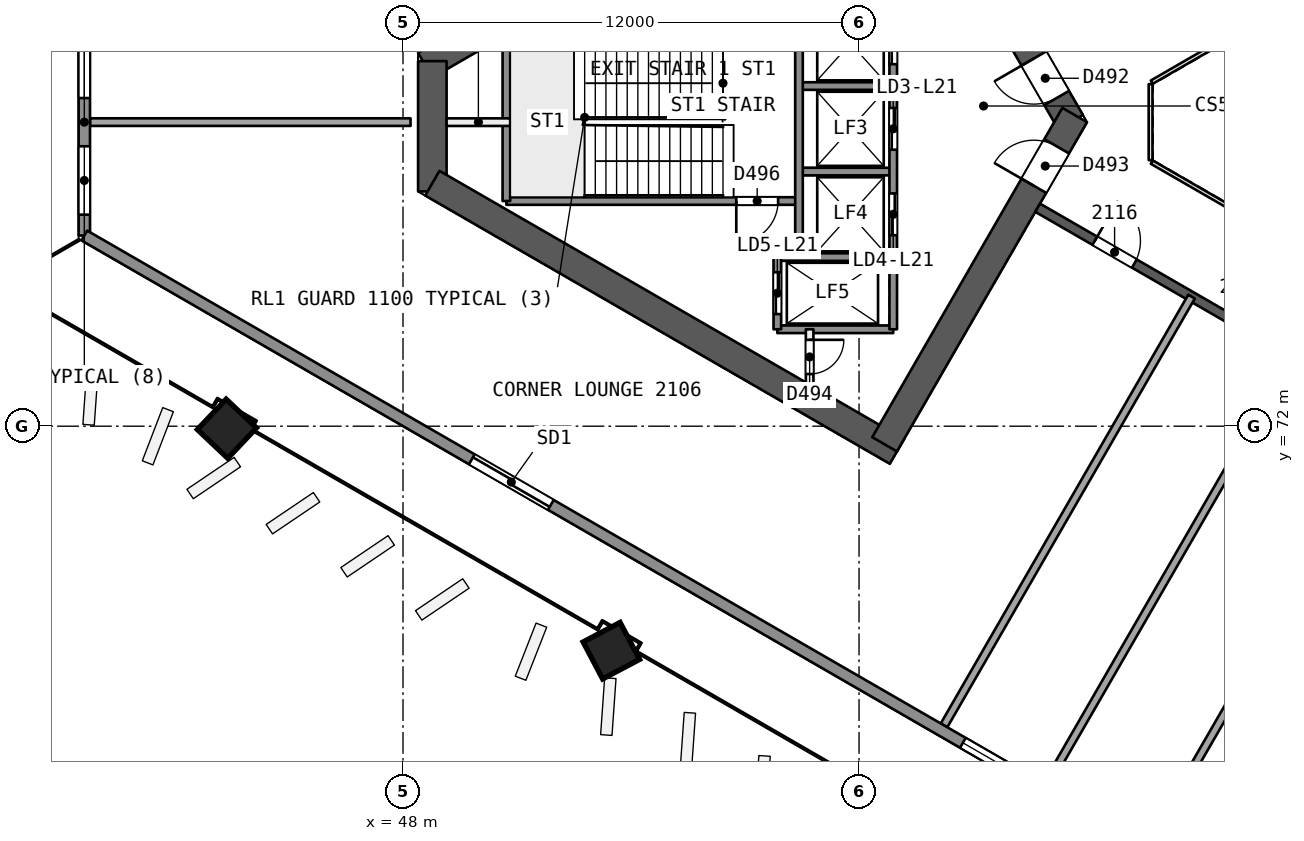
"""IFC4 building model, lengths in metres.
Left out: names, types, materials, properties, quantities, classifications, styles, units other than length and angle.
Written with IfcOpenShell. Run it as: python <this file> out.ifc"""

import sys

from ifc_helpers import new_model, si_unit, direction, frame, frame_2d, origin, origin_2d, place, context, subcontext, project, spatial, rectangle, extrude, element, fill, save


model = new_model("IFC4")
c1 = context("Model", 3, precision=1e-05, world=origin(), true_north=direction((0.0, 1.0)))
c2 = subcontext(c1, "Body", "Model", "MODEL_VIEW")
j1 = project(units=[si_unit("LENGTHUNIT", "METRE"), si_unit("PLANEANGLEUNIT", "RADIAN")], contexts=[c1])
p1 = place(None, origin())
s1 = spatial("IfcSite", under=j1, at=p1, CompositionType="ELEMENT")
p2 = place(p1, origin())
s2 = spatial("IfcBuilding", under=s1, at=p2, CompositionType="ELEMENT")
p3 = place(p2, frame((0.0, 0.0, 90.6)))
s3 = spatial("IfcBuildingStorey", under=s2, at=p3, CompositionType="ELEMENT", Elevation=90.6)
p4 = place(p3, frame((65.567, 80.0, 0.0), z_axis=(0.0, 0.0, 1.0), x_axis=(-0.499988615364, 0.866031976607, 0.0)))
e1 = element("IfcWall", 1, at=p4, inside=s3, PredefinedType="SHEAR", context=c2, shape_type="SweptSolid", body=[
    extrude(rectangle(XDim=10.163, YDim=0.75, at=frame_2d((5.082, 0.0))), origin(), (0.0, 0.0, 1.0), 3.7),
])
p5 = place(p4, frame((0.733, 0.0, 0.0)))
e2 = element("IfcOpeningElement", 2, at=p5, cuts=e1, PredefinedType="OPENING", context=c2, shape_type="SweptSolid", body=[
    extrude(rectangle(XDim=1.2, YDim=2.1, at=frame_2d((0.6, 1.05))), frame((0.0, 0.385, 0.0), z_axis=(0.0, -1.0, 0.0), x_axis=(1.0, 0.0, 0.0)), (0.0, 0.0, 1.0), 0.771),
])
p6 = place(p3, frame((60.673, 88.477, 0.0), z_axis=(0.0, 0.0, 1.0), x_axis=(-0.8660248072, -0.500001033313, 0.0)))
e3 = element("IfcWall", 3, at=p6, inside=s3, PredefinedType="SHEAR", context=c2, shape_type="SweptSolid", body=[
    extrude(rectangle(XDim=13.958, YDim=0.75, at=frame_2d((6.979, 0.0))), origin(), (0.0, 0.0, 1.0), 3.7),
])
p7 = place(p3, frame((48.772, 81.606, 0.0), z_axis=(0.0, 0.0, 1.0), x_axis=(0.0, -1.0, 0.0)))
e4 = element("IfcWall", 4, at=p7, inside=s3, PredefinedType="SHEAR", context=c2, shape_type="SweptSolid", body=[
    extrude(rectangle(XDim=3.429, YDim=0.75, at=frame_2d((1.714, 0.0))), origin(), (0.0, 0.0, 1.0), 3.7),
])
p8 = place(p3, frame((48.772, 78.394, 0.0), z_axis=(0.0, 0.0, 1.0), x_axis=(0.866028339916, -0.499994914436, 0.0)))
e5 = element("IfcWall", 5, at=p8, inside=s3, PredefinedType="SHEAR", context=c2, shape_type="SweptSolid", body=[
    extrude(rectangle(XDim=14.117, YDim=0.75, at=frame_2d((7.059, 0.0))), origin(), (0.0, 0.0, 1.0), 3.7),
])
p9 = place(p3, frame((60.673, 71.523, 0.0), z_axis=(0.0, 0.0, 1.0), x_axis=(0.499997052475, 0.866027105532, 0.0)))
e6 = element("IfcWall", 6, at=p9, inside=s3, PredefinedType="SHEAR", context=c2, shape_type="SweptSolid", body=[
    extrude(rectangle(XDim=10.005, YDim=0.75, at=frame_2d((5.002, 0.0))), origin(), (0.0, 0.0, 1.0), 3.7),
])
p10 = place(p9, frame((7.855, 0.0, 0.0)))
e7 = element("IfcOpeningElement", 7, at=p10, cuts=e6, PredefinedType="OPENING", context=c2, shape_type="SweptSolid", body=[
    extrude(rectangle(XDim=1.2, YDim=2.1, at=frame_2d((0.6, 1.05))), frame((0.0, 0.385, 0.0), z_axis=(0.0, -1.0, 0.0), x_axis=(1.0, 0.0, 0.0)), (0.0, 0.0, 1.0), 0.771),
])
p11 = place(p3, frame((64.7, 77.748, 0.0), z_axis=(0.0, 0.0, 1.0), x_axis=(0.866026492143, -0.499998114903, 0.0)))
e8 = element("IfcWall", 8, at=p11, inside=s3, PredefinedType="SHEAR", context=c2, shape_type="SweptSolid", body=[
    extrude(rectangle(XDim=15.588, YDim=0.25, at=frame_2d((7.794, 0.0))), origin(), (0.0, 0.0, 1.0), 3.2),
])
p12 = place(p11, frame((1.738, 0.0, 0.0)))
e9 = element("IfcOpeningElement", 9, at=p12, cuts=e8, PredefinedType="OPENING", context=c2, shape_type="SweptSolid", body=[
    extrude(rectangle(XDim=1.2, YDim=2.4, at=frame_2d((0.6, 1.2))), frame((0.0, 0.135, 0.0), z_axis=(0.0, -1.0, 0.0), x_axis=(1.0, 0.0, 0.0)), (0.0, 0.0, 1.0), 0.271),
])
p13 = place(p11, frame((5.785, 0.0, 0.0)))
e10 = element("IfcOpeningElement", 10, at=p13, cuts=e8, PredefinedType="OPENING", context=c2, shape_type="SweptSolid", body=[
    extrude(rectangle(XDim=0.9, YDim=2.1, at=frame_2d((0.45, 1.05))), frame((0.0, 0.135, 0.0), z_axis=(0.0, -1.0, 0.0), x_axis=(1.0, 0.0, 0.0)), (0.0, 0.0, 1.0), 0.271),
])
p14 = place(p11, frame((8.903, 0.0, 0.0)))
e11 = element("IfcOpeningElement", 11, at=p14, cuts=e8, PredefinedType="OPENING", context=c2, shape_type="SweptSolid", body=[
    extrude(rectangle(XDim=0.9, YDim=2.1, at=frame_2d((0.45, 1.05))), frame((0.0, 0.135, 0.0), z_axis=(0.0, -1.0, 0.0), x_axis=(1.0, 0.0, 0.0)), (0.0, 0.0, 1.0), 0.271),
])
p15 = place(p11, frame((12.75, 0.0, 0.0)))
e12 = element("IfcOpeningElement", 12, at=p15, cuts=e8, PredefinedType="OPENING", context=c2, shape_type="SweptSolid", body=[
    extrude(rectangle(XDim=1.0, YDim=2.1, at=frame_2d((0.5, 1.05))), frame((0.0, 0.135, 0.0), z_axis=(0.0, -1.0, 0.0), x_axis=(1.0, 0.0, 0.0)), (0.0, 0.0, 1.0), 0.271),
])
p16 = place(p3, frame((43.333, 71.925, 0.0), z_axis=(0.028559101991, 0.006859460986, 0.999568569678), x_axis=(-0.866410384874, 0.498876768373, 0.021331079692)))
e13 = element("IfcColumn", 13, at=p16, inside=s3, PredefinedType="COLUMN", context=c2, shape_type="SweptSolid", body=[
    extrude(rectangle(XDim=1.1, YDim=1.1, at=origin_2d()), origin(), (0.0, 0.0, 1.0), 3.702),
])
p17 = place(p3, frame((53.46, 66.079, 0.0), z_axis=(0.019328516974, 0.012138044789, 0.999739504221), x_axis=(-0.865690909737, 0.500465383244, 0.010660627254)))
e14 = element("IfcColumn", 14, at=p17, inside=s3, PredefinedType="COLUMN", context=c2, shape_type="SweptSolid", body=[
    extrude(rectangle(XDim=1.1, YDim=1.1, at=origin_2d()), origin(), (0.0, 0.0, 1.0), 3.701),
])
p18 = place(p3, frame((39.763, 80.001, 0.0), z_axis=(0.0, 0.0, 1.0), x_axis=(1.0, 0.0, 0.0)))
e15 = element("IfcWall", 15, at=p18, inside=s3, PredefinedType="PARTITIONING", context=c2, shape_type="SweptSolid", body=[
    extrude(rectangle(XDim=8.435, YDim=0.2, at=frame_2d((4.218, 0.0))), origin(), (0.0, 0.0, 1.0), 3.2),
])
for number, where, z_axis, x_axis in (
    (16, (62.236, 64.128, 0.0), (0.0, 0.0, 1.0), (0.5, 0.866, 0.0)),
    (17, (64.936, 62.569, 0.0), (0.0, 0.0, 1.0), (0.5, 0.866, 0.0)),
    (18, (67.636, 61.01, 0.0), (0.0, 0.0, 1.0), (0.5, 0.866, 0.0)),
):
    element("IfcWall", number, at=place(p3, frame(where, z_axis=z_axis, x_axis=x_axis)), inside=s3, PredefinedType="PARTITIONING", context=c2, shape_type="SweptSolid", body=[
        extrude(rectangle(XDim=13.028, YDim=0.2, at=frame_2d((6.514, 0.0))), origin(), (0.0, 0.0, 1.0), 3.2),
    ])
p19 = place(p3, frame((39.614, 77.017, 0.0), z_axis=(0.0, 0.0, 1.0), x_axis=(0.0, 1.0, 0.0)))
e19 = element("IfcWall", 19, at=p19, inside=s3, PredefinedType="SOLIDWALL", context=c2, shape_type="SweptSolid", body=[
    extrude(rectangle(XDim=5.966, YDim=0.3, at=frame_2d((2.983, 0.0))), origin(), (0.0, 0.0, 1.0), 3.2),
])
p20 = place(p19, frame((0.549, 0.0, 0.9)))
e20 = element("IfcOpeningElement", 20, at=p20, cuts=e19, PredefinedType="OPENING", context=c2, shape_type="SweptSolid", body=[
    extrude(rectangle(XDim=1.8, YDim=1.5, at=frame_2d((0.9, 0.75))), frame((0.0, 0.161, 0.0), z_axis=(0.0, -1.0, 0.0), x_axis=(1.0, 0.0, 0.0)), (0.0, 0.0, 1.0), 0.321),
])
p21 = place(p19, frame((3.617, 0.0, 0.9)))
e21 = element("IfcOpeningElement", 21, at=p21, cuts=e19, PredefinedType="OPENING", context=c2, shape_type="SweptSolid", body=[
    extrude(rectangle(XDim=1.8, YDim=1.5, at=frame_2d((0.9, 0.75))), frame((0.0, 0.161, 0.0), z_axis=(0.0, -1.0, 0.0), x_axis=(1.0, 0.0, 0.0)), (0.0, 0.0, 1.0), 0.321),
])
p22 = place(p3, frame((90.11, 47.863, 0.0), z_axis=(0.0, 0.0, 1.0), x_axis=(-0.866024236478, 0.500002021829, 0.0)))
e22 = element("IfcWall", 22, at=p22, inside=s3, PredefinedType="SOLIDWALL", context=c2, shape_type="SweptSolid", body=[
    extrude(rectangle(XDim=58.307, YDim=0.3, at=frame_2d((29.154, 0.0))), origin(), (0.0, 0.0, 1.0), 3.2),
])
p23 = place(p22, frame((44.133, 0.0, 0.0)))
e23 = element("IfcOpeningElement", 23, at=p23, cuts=e22, PredefinedType="OPENING", context=c2, shape_type="SweptSolid", body=[
    extrude(rectangle(XDim=2.4, YDim=2.4, at=frame_2d((1.2, 1.2))), frame((0.0, 0.161, 0.0), z_axis=(0.0, -1.0, 0.0), x_axis=(1.0, 0.0, 0.0)), (0.0, 0.0, 1.0), 0.321),
])
p24 = place(p22, frame((22.498, 0.0, 0.0)))
e24 = element("IfcOpeningElement", 24, at=p24, cuts=e22, PredefinedType="OPENING", context=c2, shape_type="SweptSolid", body=[
    extrude(rectangle(XDim=2.4, YDim=2.4, at=frame_2d((1.2, 1.2))), frame((0.0, 0.161, 0.0), z_axis=(0.0, -1.0, 0.0), x_axis=(1.0, 0.0, 0.0)), (0.0, 0.0, 1.0), 0.321),
])
p25 = place(p22, frame((10.65, 0.0, 0.0)))
e25 = element("IfcOpeningElement", 25, at=p25, cuts=e22, PredefinedType="OPENING", context=c2, shape_type="SweptSolid", body=[
    extrude(rectangle(XDim=2.4, YDim=2.4, at=frame_2d((1.2, 1.2))), frame((0.0, 0.161, 0.0), z_axis=(0.0, -1.0, 0.0), x_axis=(1.0, 0.0, 0.0)), (0.0, 0.0, 1.0), 0.321),
])
p26 = place(p22, frame((29.812, 0.0, 0.9)))
e26 = element("IfcOpeningElement", 26, at=p26, cuts=e22, PredefinedType="OPENING", context=c2, shape_type="SweptSolid", body=[
    extrude(rectangle(XDim=1.8, YDim=1.5, at=frame_2d((0.9, 0.75))), frame((0.0, 0.161, 0.0), z_axis=(0.0, -1.0, 0.0), x_axis=(1.0, 0.0, 0.0)), (0.0, 0.0, 1.0), 0.321),
])
p27 = place(p22, frame((26.695, 0.0, 0.9)))
e27 = element("IfcOpeningElement", 27, at=p27, cuts=e22, PredefinedType="OPENING", context=c2, shape_type="SweptSolid", body=[
    extrude(rectangle(XDim=1.8, YDim=1.5, at=frame_2d((0.9, 0.75))), frame((0.0, 0.161, 0.0), z_axis=(0.0, -1.0, 0.0), x_axis=(1.0, 0.0, 0.0)), (0.0, 0.0, 1.0), 0.321),
])
p28 = place(p3, frame((60.9, 80.95, 0.0), z_axis=(0.0, 0.0, 1.0), x_axis=(-1.0, 0.0, 0.0)))
e28 = element("IfcWall", 28, at=p28, inside=s3, PredefinedType="SOLIDWALL", context=c2, shape_type="SweptSolid", body=[
    extrude(rectangle(XDim=2.48, YDim=0.2, at=frame_2d((1.24, 0.0))), origin(), (0.0, 0.0, 1.0), 3.2),
])
p29 = place(p3, frame((50.82, 80.0, 0.0), z_axis=(0.0, 0.0, 1.0), x_axis=(-1.0, 0.0, 0.0)))
e29 = element("IfcWall", 29, at=p29, inside=s3, PredefinedType="PARTITIONING", context=c2, shape_type="SweptSolid", body=[
    extrude(rectangle(XDim=1.673, YDim=0.2, at=frame_2d((0.836, 0.0))), origin(), (0.0, 0.0, 1.0), 3.2),
])
p30 = place(p3, frame((60.9, 78.7, 0.0), z_axis=(0.0, 0.0, 1.0), x_axis=(-1.0, 0.0, 0.0)))
e30 = element("IfcWall", 30, at=p30, inside=s3, PredefinedType="SOLIDWALL", context=c2, shape_type="SweptSolid", body=[
    extrude(rectangle(XDim=2.48, YDim=0.2, at=frame_2d((1.24, 0.0))), origin(), (0.0, 0.0, 1.0), 3.2),
])
p31 = place(p3, frame((58.42, 77.925, 0.0), z_axis=(0.0, 0.0, 1.0), x_axis=(-1.0, 0.0, 0.0)))
e31 = element("IfcWall", 31, at=p31, inside=s3, PredefinedType="SOLIDWALL", context=c2, shape_type="SweptSolid", body=[
    extrude(rectangle(XDim=7.7, YDim=0.2, at=frame_2d((3.85, 0.0))), origin(), (0.0, 0.0, 1.0), 3.2),
])
p32 = place(p31, frame((0.55, 0.0, 0.0)))
e32 = element("IfcOpeningElement", 32, at=p32, cuts=e31, PredefinedType="OPENING", context=c2, shape_type="SweptSolid", body=[
    extrude(rectangle(XDim=1.1, YDim=2.1, at=frame_2d((0.55, 1.05))), frame((0.0, 0.11, 0.0), z_axis=(0.0, -1.0, 0.0), x_axis=(1.0, 0.0, 0.0)), (0.0, 0.0, 1.0), 0.221),
])
for number, where, z_axis, x_axis in (
    (33, (60.9, 76.45, 0.0), (0.0, 0.0, 1.0), (-1.0, 0.0, 0.0)),
    (34, (60.9, 74.55, 0.0), (0.0, 0.0, 1.0), (-1.0, 0.0, 0.0)),
):
    element("IfcWall", number, at=place(p3, frame(where, z_axis=z_axis, x_axis=x_axis)), inside=s3, PredefinedType="SOLIDWALL", context=c2, shape_type="SweptSolid", body=[
        extrude(rectangle(XDim=3.05, YDim=0.2, at=frame_2d((1.525, 0.0))), origin(), (0.0, 0.0, 1.0), 3.2),
    ])
p33 = place(p3, frame((60.9, 85.45, 0.0), z_axis=(0.0, 0.0, 1.0), x_axis=(0.0, -1.0, 0.0)))
e35 = element("IfcWall", 35, at=p33, inside=s3, PredefinedType="SOLIDWALL", context=c2, shape_type="SweptSolid", body=[
    extrude(rectangle(XDim=10.9, YDim=0.2, at=frame_2d((5.45, 0.0))), origin(), (0.0, 0.0, 1.0), 3.2),
])
p34 = place(p33, frame((0.575, 0.0, 0.0)))
e36 = element("IfcOpeningElement", 36, at=p34, cuts=e35, PredefinedType="OPENING", context=c2, shape_type="SweptSolid", body=[
    extrude(rectangle(XDim=1.1, YDim=2.1, at=frame_2d((0.55, 1.05))), frame((0.0, 0.11, 0.0), z_axis=(0.0, -1.0, 0.0), x_axis=(1.0, 0.0, 0.0)), (0.0, 0.0, 1.0), 0.221),
])
p35 = place(p33, frame((2.825, 0.0, 0.0)))
e37 = element("IfcOpeningElement", 37, at=p35, cuts=e35, PredefinedType="OPENING", context=c2, shape_type="SweptSolid", body=[
    extrude(rectangle(XDim=1.1, YDim=2.1, at=frame_2d((0.55, 1.05))), frame((0.0, 0.11, 0.0), z_axis=(0.0, -1.0, 0.0), x_axis=(1.0, 0.0, 0.0)), (0.0, 0.0, 1.0), 0.221),
])
p36 = place(p33, frame((5.075, 0.0, 0.0)))
e38 = element("IfcOpeningElement", 38, at=p36, cuts=e35, PredefinedType="OPENING", context=c2, shape_type="SweptSolid", body=[
    extrude(rectangle(XDim=1.1, YDim=2.1, at=frame_2d((0.55, 1.05))), frame((0.0, 0.11, 0.0), z_axis=(0.0, -1.0, 0.0), x_axis=(1.0, 0.0, 0.0)), (0.0, 0.0, 1.0), 0.221),
])
p37 = place(p33, frame((7.325, 0.0, 0.0)))
e39 = element("IfcOpeningElement", 39, at=p37, cuts=e35, PredefinedType="OPENING", context=c2, shape_type="SweptSolid", body=[
    extrude(rectangle(XDim=1.1, YDim=2.1, at=frame_2d((0.55, 1.05))), frame((0.0, 0.11, 0.0), z_axis=(0.0, -1.0, 0.0), x_axis=(1.0, 0.0, 0.0)), (0.0, 0.0, 1.0), 0.221),
])
p38 = place(p3, frame((58.7, 74.55, 0.0), z_axis=(0.0, 0.0, 1.0), x_axis=(0.0, -1.0, 0.0)))
e40 = element("IfcWall", 40, at=p38, inside=s3, PredefinedType="PARTITIONING", context=c2, shape_type="SweptSolid", body=[
    extrude(rectangle(XDim=1.455, YDim=0.2, at=frame_2d((0.728, 0.0))), origin(), (0.0, 0.0, 1.0), 3.2),
])
p39 = place(p38, frame((0.278, 0.0, 0.0)))
e41 = element("IfcOpeningElement", 41, at=p39, cuts=e40, PredefinedType="OPENING", context=c2, shape_type="SweptSolid", body=[
    extrude(rectangle(XDim=0.9, YDim=2.1, at=frame_2d((0.45, 1.05))), frame((0.0, 0.11, 0.0), z_axis=(0.0, -1.0, 0.0), x_axis=(1.0, 0.0, 0.0)), (0.0, 0.0, 1.0), 0.221),
])
p40 = place(p3, frame((58.42, 85.45, 0.0), z_axis=(0.0, 0.0, 1.0), x_axis=(0.0, -1.0, 0.0)))
e42 = element("IfcWall", 42, at=p40, inside=s3, PredefinedType="SOLIDWALL", context=c2, shape_type="SweptSolid", body=[
    extrude(rectangle(XDim=9.0, YDim=0.2, at=frame_2d((4.5, 0.0))), origin(), (0.0, 0.0, 1.0), 3.2),
])
p41 = place(p3, frame((57.85, 76.45, 0.0), z_axis=(0.0, 0.0, 1.0), x_axis=(0.0, -1.0, 0.0)))
e43 = element("IfcWall", 43, at=p41, inside=s3, PredefinedType="SOLIDWALL", context=c2, shape_type="SweptSolid", body=[
    extrude(rectangle(XDim=1.9, YDim=0.2, at=frame_2d((0.95, 0.0))), origin(), (0.0, 0.0, 1.0), 3.2),
])
p42 = place(p41, frame((0.4, 0.0, 0.0)))
e44 = element("IfcOpeningElement", 44, at=p42, cuts=e43, PredefinedType="OPENING", context=c2, shape_type="SweptSolid", body=[
    extrude(rectangle(XDim=1.1, YDim=2.1, at=frame_2d((0.55, 1.05))), frame((0.0, 0.11, 0.0), z_axis=(0.0, -1.0, 0.0), x_axis=(1.0, 0.0, 0.0)), (0.0, 0.0, 1.0), 0.221),
])
p43 = place(p3, frame((50.72, 82.075, 0.0), z_axis=(0.0, 0.0, 1.0), x_axis=(0.0, -1.0, 0.0)))
e45 = element("IfcWall", 45, at=p43, inside=s3, PredefinedType="SOLIDWALL", context=c2, shape_type="SweptSolid", body=[
    extrude(rectangle(XDim=4.15, YDim=0.2, at=frame_2d((2.075, 0.0))), origin(), (0.0, 0.0, 1.0), 3.2),
])
p44 = place(p3, frame((77.738, 86.846, 0.0), z_axis=(0.0, 0.0, 1.0), x_axis=(-0.866026658274, -0.499997827154, 0.0)))
e46 = element("IfcWall", 46, at=p44, inside=s3, PredefinedType="PARTITIONING", context=c2, shape_type="SweptSolid", body=[
    extrude(rectangle(XDim=11.588, YDim=0.1, at=frame_2d((5.794, 0.0))), origin(), (0.0, 0.0, 1.0), 3.2),
])
p45 = place(p3, frame((67.672, 81.0, 0.0), z_axis=(0.0, 0.0, 1.0), x_axis=(0.0, -1.0, 0.0)))
e47 = element("IfcWall", 47, at=p45, inside=s3, PredefinedType="PARTITIONING", context=c2, shape_type="SweptSolid", body=[
    extrude(rectangle(XDim=2.0, YDim=0.1, at=frame_2d((1.0, 0.0))), origin(), (0.0, 0.0, 1.0), 3.2),
])
p46 = place(p3, frame((67.702, 78.948, 0.0), z_axis=(0.0, 0.0, 1.0), x_axis=(0.866026658274, -0.499997827154, 0.0)))
e48 = element("IfcWall", 48, at=p46, inside=s3, PredefinedType="PARTITIONING", context=c2, shape_type="SweptSolid", body=[
    extrude(rectangle(XDim=11.588, YDim=0.1, at=frame_2d((5.794, 0.0))), origin(), (0.0, 0.0, 1.0), 3.2),
])
p47 = place(p12, origin())
e49 = element("IfcDoor", 49, at=p47, inside=s3, OperationType="SINGLE_SWING_LEFT", PredefinedType="NOTDEFINED", context=c2, shape_type="SweptSolid", body=[
    extrude(rectangle(XDim=1.2, YDim=2.4, at=frame_2d((0.6, 1.2))), frame((0.0, 0.025, 0.0), z_axis=(0.0, -1.0, 0.0), x_axis=(1.0, 0.0, 0.0)), (0.0, 0.0, 1.0), 0.05),
])
fill(e9, e49)
p48 = place(p20, origin())
e50 = element("IfcWindow", 50, at=p48, inside=s3, PartitioningType="SINGLE_PANEL", PredefinedType="WINDOW", context=c2, shape_type="SweptSolid", body=[
    extrude(rectangle(XDim=1.8, YDim=1.5, at=frame_2d((0.9, 0.75))), frame((0.0, 0.03, 0.0), z_axis=(0.0, -1.0, 0.0), x_axis=(1.0, 0.0, 0.0)), (0.0, 0.0, 1.0), 0.06),
])
fill(e20, e50)
p49 = place(p21, origin())
e51 = element("IfcWindow", 51, at=p49, inside=s3, PartitioningType="SINGLE_PANEL", PredefinedType="WINDOW", context=c2, shape_type="SweptSolid", body=[
    extrude(rectangle(XDim=1.8, YDim=1.5, at=frame_2d((0.9, 0.75))), frame((0.0, 0.03, 0.0), z_axis=(0.0, -1.0, 0.0), x_axis=(1.0, 0.0, 0.0)), (0.0, 0.0, 1.0), 0.06),
])
fill(e21, e51)
p50 = place(p23, origin())
e52 = element("IfcDoor", 52, at=p50, inside=s3, OperationType="SLIDING_TO_LEFT", PredefinedType="NOTDEFINED", context=c2, shape_type="SweptSolid", body=[
    extrude(rectangle(XDim=2.4, YDim=2.4, at=frame_2d((1.2, 1.2))), frame((0.0, 0.025, 0.0), z_axis=(0.0, -1.0, 0.0), x_axis=(1.0, 0.0, 0.0)), (0.0, 0.0, 1.0), 0.05),
])
fill(e23, e52)
p51 = place(p26, origin())
e53 = element("IfcWindow", 53, at=p51, inside=s3, PartitioningType="SINGLE_PANEL", PredefinedType="WINDOW", context=c2, shape_type="SweptSolid", body=[
    extrude(rectangle(XDim=1.8, YDim=1.5, at=frame_2d((0.9, 0.75))), frame((0.0, 0.03, 0.0), z_axis=(0.0, -1.0, 0.0), x_axis=(1.0, 0.0, 0.0)), (0.0, 0.0, 1.0), 0.06),
])
fill(e26, e53)
p52 = place(p5, origin())
e54 = element("IfcDoor", 54, at=p52, inside=s3, OperationType="SINGLE_SWING_RIGHT", PredefinedType="NOTDEFINED", context=c2, shape_type="SweptSolid", body=[
    extrude(rectangle(XDim=1.2, YDim=2.1, at=frame_2d((0.6, 1.05))), frame((0.0, 0.025, 0.0), z_axis=(0.0, -1.0, 0.0), x_axis=(1.0, 0.0, 0.0)), (0.0, 0.0, 1.0), 0.05),
])
fill(e2, e54)
p53 = place(p10, origin())
e55 = element("IfcDoor", 55, at=p53, inside=s3, OperationType="SINGLE_SWING_LEFT", PredefinedType="NOTDEFINED", context=c2, shape_type="SweptSolid", body=[
    extrude(rectangle(XDim=1.2, YDim=2.1, at=frame_2d((0.6, 1.05))), frame((0.0, 0.025, 0.0), z_axis=(0.0, -1.0, 0.0), x_axis=(1.0, 0.0, 0.0)), (0.0, 0.0, 1.0), 0.05),
])
fill(e7, e55)
p54 = place(p35, origin())
e56 = element("IfcDoor", 56, at=p54, inside=s3, OperationType="SLIDING_TO_LEFT", PredefinedType="NOTDEFINED", context=c2, shape_type="SweptSolid", body=[
    extrude(rectangle(XDim=1.1, YDim=2.1, at=frame_2d((0.55, 1.05))), frame((0.0, 0.025, 0.0), z_axis=(0.0, -1.0, 0.0), x_axis=(1.0, 0.0, 0.0)), (0.0, 0.0, 1.0), 0.05),
])
fill(e37, e56)
p55 = place(p36, origin())
e57 = element("IfcDoor", 57, at=p55, inside=s3, OperationType="SLIDING_TO_RIGHT", PredefinedType="NOTDEFINED", context=c2, shape_type="SweptSolid", body=[
    extrude(rectangle(XDim=1.1, YDim=2.1, at=frame_2d((0.55, 1.05))), frame((0.0, 0.025, 0.0), z_axis=(0.0, -1.0, 0.0), x_axis=(1.0, 0.0, 0.0)), (0.0, 0.0, 1.0), 0.05),
])
fill(e38, e57)
p56 = place(p37, origin())
e58 = element("IfcDoor", 58, at=p56, inside=s3, OperationType="SLIDING_TO_LEFT", PredefinedType="NOTDEFINED", context=c2, shape_type="SweptSolid", body=[
    extrude(rectangle(XDim=1.1, YDim=2.1, at=frame_2d((0.55, 1.05))), frame((0.0, 0.025, 0.0), z_axis=(0.0, -1.0, 0.0), x_axis=(1.0, 0.0, 0.0)), (0.0, 0.0, 1.0), 0.05),
])
fill(e39, e58)
p57 = place(p42, origin())
e59 = element("IfcDoor", 59, at=p57, inside=s3, OperationType="SLIDING_TO_RIGHT", PredefinedType="NOTDEFINED", context=c2, shape_type="SweptSolid", body=[
    extrude(rectangle(XDim=1.1, YDim=2.1, at=frame_2d((0.55, 1.05))), frame((0.0, 0.025, 0.0), z_axis=(0.0, -1.0, 0.0), x_axis=(1.0, 0.0, 0.0)), (0.0, 0.0, 1.0), 0.05),
])
fill(e44, e59)
p58 = place(p39, origin())
e60 = element("IfcDoor", 60, at=p58, inside=s3, OperationType="SINGLE_SWING_LEFT", PredefinedType="NOTDEFINED", context=c2, shape_type="SweptSolid", body=[
    extrude(rectangle(XDim=0.9, YDim=2.1, at=frame_2d((0.45, 1.05))), frame((0.0, 0.025, 0.0), z_axis=(0.0, -1.0, 0.0), x_axis=(1.0, 0.0, 0.0)), (0.0, 0.0, 1.0), 0.05),
])
fill(e41, e60)
p59 = place(p32, origin())
e61 = element("IfcDoor", 61, at=p59, inside=s3, OperationType="SINGLE_SWING_RIGHT", PredefinedType="NOTDEFINED", context=c2, shape_type="SweptSolid", body=[
    extrude(rectangle(XDim=1.1, YDim=2.1, at=frame_2d((0.55, 1.05))), frame((0.0, 0.025, 0.0), z_axis=(0.0, -1.0, 0.0), x_axis=(1.0, 0.0, 0.0)), (0.0, 0.0, 1.0), 0.05),
])
fill(e32, e61)
save(model, sys.argv[1])
